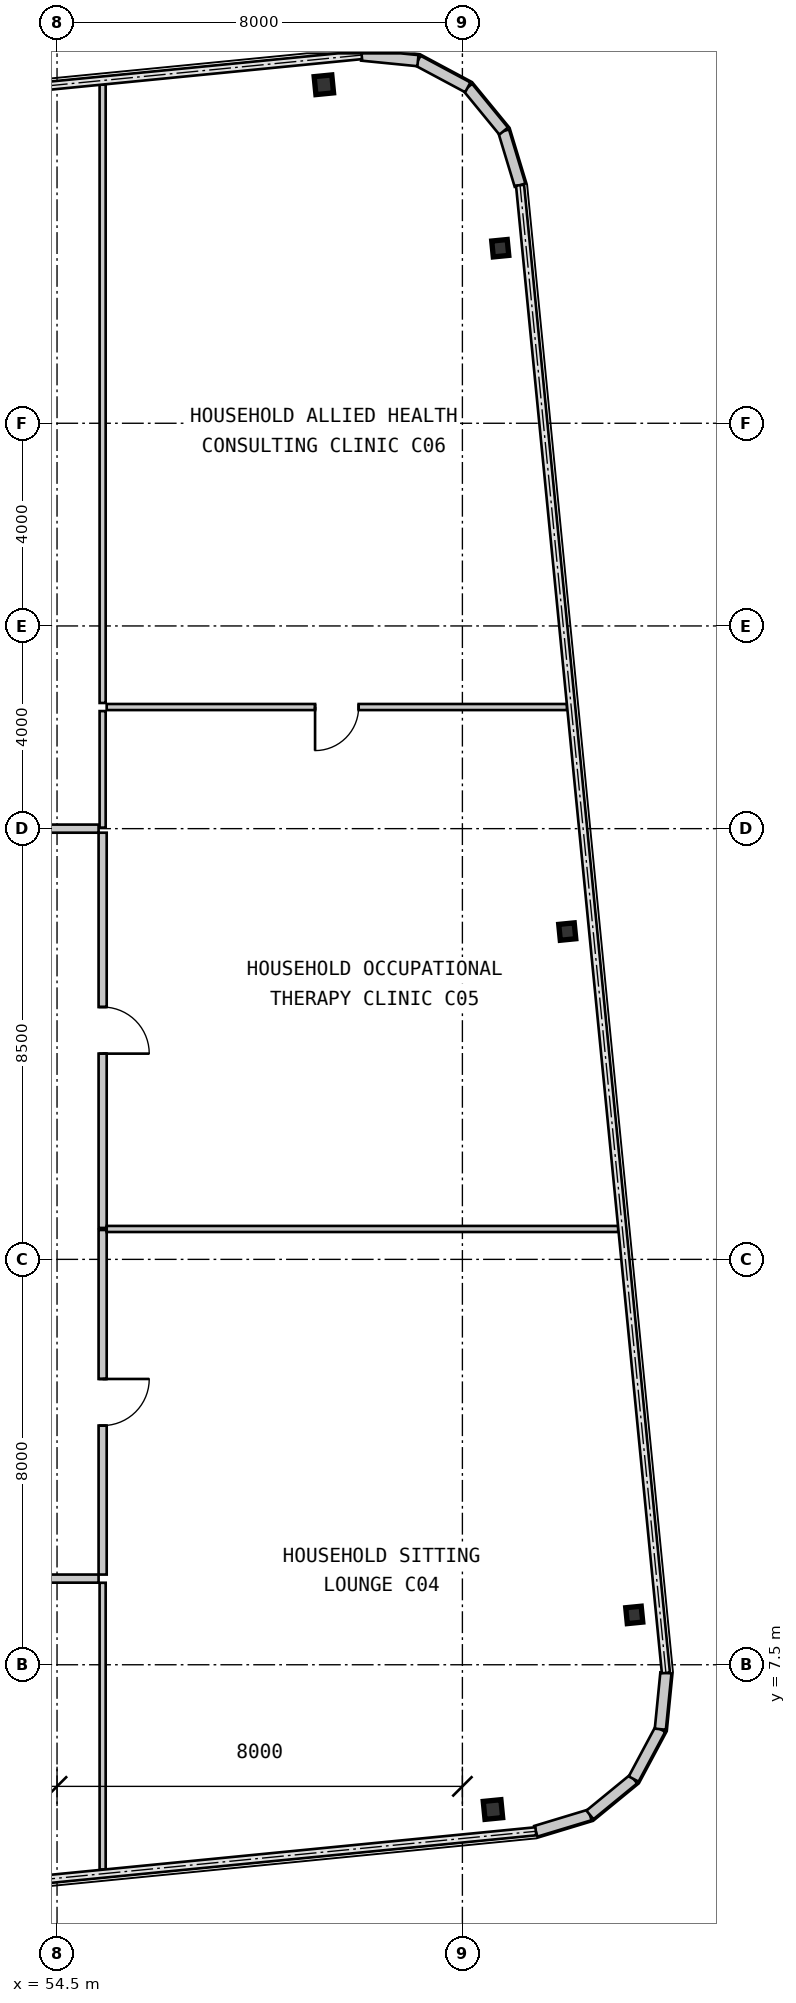
"""IFC4 building model, lengths in metres.
Left out: names, types, materials, properties, quantities, classifications, styles, units other than length and angle.
Written with IfcOpenShell. Run it as: python <this file> out.ifc"""

import sys

from ifc_helpers import new_model, si_unit, direction, frame, frame_2d, origin, origin_2d, place, context, subcontext, project, spatial, rectangle, i_section, extrude, source, transform, mapped, element, fill, save


model = new_model("IFC4")
c1 = context("Model", 3, precision=1e-05, world=origin(), true_north=direction((0.0, 1.0)))
c2 = subcontext(c1, "Body", "Model", "MODEL_VIEW")
j1 = project(units=[si_unit("LENGTHUNIT", "METRE"), si_unit("PLANEANGLEUNIT", "RADIAN")], contexts=[c1])
p1 = place(None, origin())
s1 = spatial("IfcSite", under=j1, at=p1, CompositionType="ELEMENT")
p2 = place(p1, origin())
s2 = spatial("IfcBuilding", under=s1, at=p2, CompositionType="ELEMENT")
p3 = place(p2, frame((0.0, 0.0, 87.15)))
s3 = spatial("IfcBuildingStorey", under=s2, at=p3, CompositionType="ELEMENT", Elevation=87.15)
m1 = source(origin(), c2, "Body", "SweptSolid", [
    extrude(i_section(OverallWidth=0.35, OverallDepth=0.356, WebThickness=0.018, FlangeThickness=0.028, at=origin_2d()), origin(), (0.0, 0.0, 1.0), 3.15),
])
for number, where, z_axis, x_axis in (
    (1, (63.103, 4.643, 0.0), (0.0, 0.0, 1.0), (0.995, 0.098, 0.0)),
    (2, (59.766, 38.68, 0.0), (0.0, 0.0, 1.0), (0.995, 0.098, 0.0)),
):
    element("IfcColumn", number, at=place(p3, frame(where, z_axis=z_axis, x_axis=x_axis)), inside=s3, PredefinedType="COLUMN", context=c2, shape_type="MappedRepresentation", body=[
        mapped(m1, transform((0.0, 0.0, 0.0), scale=1.0)),
    ])
m2 = source(origin(), c2, "Body", "SweptSolid", [
    extrude(i_section(OverallWidth=0.307, OverallDepth=0.315, WebThickness=0.012, FlangeThickness=0.019, at=origin_2d()), origin(), (0.0, 0.0, 1.0), 3.15),
])
for number, where, z_axis, x_axis in (
    (3, (65.892, 8.484, 0.0), (0.0, 0.0, 1.0), (0.995, 0.098, 0.0)),
    (4, (64.57, 21.969, 0.0), (0.0, 0.0, 1.0), (0.995, 0.098, 0.0)),
    (5, (63.247, 35.454, 0.0), (0.0, 0.0, 1.0), (0.995, 0.098, 0.0)),
):
    element("IfcColumn", number, at=place(p3, frame(where, z_axis=z_axis, x_axis=x_axis)), inside=s3, PredefinedType="COLUMN", context=c2, shape_type="MappedRepresentation", body=[
        mapped(m2, transform((0.0, 0.0, 0.0), scale=1.0)),
    ])
m3 = source(origin(), c2, "Body", "SweptSolid", [
    extrude(rectangle(XDim=1.116, YDim=0.22, at=frame_2d((0.558, 0.0))), origin(), (0.0, 0.0, 1.0), 2.93),
])
p4 = place(p3, frame((63.949, 4.214, 0.0), z_axis=(0.0, 0.0, 1.0), x_axis=(0.957052003726, 0.289916301997, 0.0)))
e6 = element("IfcWall", 6, at=p4, inside=s3, PredefinedType="SOLIDWALL", context=c2, shape_type="MappedRepresentation", body=[
    mapped(m3, transform((0.0, 0.0, 0.0), scale=1.0)),
])
m4 = source(origin(), c2, "Body", "SweptSolid", [
    extrude(rectangle(XDim=1.116, YDim=0.22, at=frame_2d((0.558, 0.0))), origin(), (0.0, 0.0, 1.0), 2.93),
])
p5 = place(p3, frame((65.017, 4.537, 0.0), z_axis=(0.0, 0.0, 1.0), x_axis=(0.773342870285, 0.633988016432, 0.0)))
e7 = element("IfcWall", 7, at=p5, inside=s3, PredefinedType="SOLIDWALL", context=c2, shape_type="MappedRepresentation", body=[
    mapped(m4, transform((0.0, 0.0, 0.0), scale=1.0)),
])
p6 = place(p3, frame((65.88, 5.245, 0.0), z_axis=(0.0, 0.0, 1.0), x_axis=(0.471723463201, 0.881746547635, 0.0)))
e8 = element("IfcWall", 8, at=p6, inside=s3, PredefinedType="SOLIDWALL", context=c2, shape_type="MappedRepresentation", body=[
    mapped(m3, transform((0.0, 0.0, 0.0), scale=1.0)),
])
for number, where, z_axis, x_axis in (
    (9, (66.406, 6.229, 0.0), (0.0, 0.0, 1.0), (0.098, 0.995, 0.0)),
    (10, (63.638, 36.698, 0.0), (0.0, 0.0, 1.0), (-0.29, 0.957, 0.0)),
):
    element("IfcWall", number, at=place(p3, frame(where, z_axis=z_axis, x_axis=x_axis)), inside=s3, PredefinedType="SOLIDWALL", context=c2, shape_type="MappedRepresentation", body=[
        mapped(m4, transform((0.0, 0.0, 0.0), scale=1.0)),
    ])
p7 = place(p3, frame((63.314, 37.766, 0.0), z_axis=(0.0, 0.0, 1.0), x_axis=(-0.634095287989, 0.773254916409, 0.0)))
e11 = element("IfcWall", 11, at=p7, inside=s3, PredefinedType="SOLIDWALL", context=c2, shape_type="MappedRepresentation", body=[
    mapped(m3, transform((0.0, 0.0, 0.0), scale=1.0)),
])
for number, where, z_axis, x_axis in (
    (12, (62.607, 38.629, 0.0), (0.0, 0.0, 1.0), (-0.882, 0.472, 0.0)),
    (13, (61.623, 39.156, 0.0), (0.0, 0.0, 1.0), (-0.995, 0.098, 0.0)),
):
    element("IfcWall", number, at=place(p3, frame(where, z_axis=z_axis, x_axis=x_axis)), inside=s3, PredefinedType="SOLIDWALL", context=c2, shape_type="MappedRepresentation", body=[
        mapped(m4, transform((0.0, 0.0, 0.0), scale=1.0)),
    ])
m5 = source(origin(), c2, "Body", "SweptSolid", [
    extrude(rectangle(XDim=2.04, YDim=0.16, at=frame_2d((1.02, 0.0))), origin(), (0.0, 0.0, 1.0), 2.93),
])
p8 = place(p3, frame((55.32, 9.2, 0.0), z_axis=(0.0, 0.0, 1.0), x_axis=(-1.0, 0.0, 0.0)))
e14 = element("IfcWall", 14, at=p8, inside=s3, PredefinedType="PARTITIONING", context=c2, shape_type="MappedRepresentation", body=[
    mapped(m5, transform((0.0, 0.0, 0.0), scale=1.0)),
])
m6 = source(origin(), c2, "Body", "SweptSolid", [
    extrude(rectangle(XDim=6.8, YDim=0.16, at=frame_2d((3.4, 0.0))), origin(), (0.0, 0.0, 1.0), 2.93),
])
p9 = place(p3, frame((55.4, 16.08, 0.0), z_axis=(0.0, 0.0, 1.0), x_axis=(0.0, -1.0, 0.0)))
e15 = element("IfcWall", 15, at=p9, inside=s3, PredefinedType="PARTITIONING", context=c2, shape_type="MappedRepresentation", body=[
    mapped(m6, transform((0.0, 0.0, 0.0), scale=1.0)),
])
m7 = source(origin(), c2, "Body", "SweptSolid", [
    extrude(rectangle(XDim=0.92, YDim=2.1, at=frame_2d((0.46, 1.05))), frame((0.0, 0.09, 0.0), z_axis=(0.0, -1.0, 0.0), x_axis=(1.0, 0.0, 0.0)), (0.0, 0.0, 1.0), 0.18),
])
p10 = place(p9, frame((2.94, 0.0, 0.0)))
e16 = element("IfcOpeningElement", 16, at=p10, cuts=e15, PredefinedType="OPENING", context=c2, shape_type="MappedRepresentation", body=[
    mapped(m7, transform((0.0, 0.0, 0.0), scale=1.0)),
])
m8 = source(origin(), c2, "Body", "SweptSolid", [
    extrude(rectangle(XDim=7.8, YDim=0.16, at=frame_2d((3.9, 0.0))), origin(), (0.0, 0.0, 1.0), 2.93),
])
p11 = place(p3, frame((55.4, 23.92, 0.0), z_axis=(0.0, 0.0, 1.0), x_axis=(0.0, -1.0, 0.0)))
e17 = element("IfcWall", 17, at=p11, inside=s3, PredefinedType="PARTITIONING", context=c2, shape_type="MappedRepresentation", body=[
    mapped(m8, transform((0.0, 0.0, 0.0), scale=1.0)),
])
p12 = place(p11, frame((3.44, 0.0, 0.0)))
e18 = element("IfcOpeningElement", 18, at=p12, cuts=e17, PredefinedType="OPENING", context=c2, shape_type="MappedRepresentation", body=[
    mapped(m7, transform((0.0, 0.0, 0.0), scale=1.0)),
])
m9 = source(origin(), c2, "Body", "SweptSolid", [
    extrude(rectangle(XDim=3.016, YDim=0.16, at=frame_2d((1.508, 0.0))), origin(), (0.0, 0.0, 1.0), 2.93),
])
p13 = place(p3, frame((52.304, 24.0, 0.0), z_axis=(0.0, 0.0, 1.0), x_axis=(1.0, 0.0, 0.0)))
e19 = element("IfcWall", 19, at=p13, inside=s3, PredefinedType="PARTITIONING", context=c2, shape_type="MappedRepresentation", body=[
    mapped(m9, transform((0.0, 0.0, 0.0), scale=1.0)),
])
m10 = source(origin(), c2, "Body", "SweptSolid", [
    extrude(rectangle(XDim=5.658, YDim=0.12, at=frame_2d((2.829, 0.0))), origin(), (0.0, 0.0, 1.0), 2.93),
])
p14 = place(p3, frame((55.4, 9.118, 0.0), z_axis=(0.0, 0.0, 1.0), x_axis=(0.0, -1.0, 0.0)))
e20 = element("IfcWall", 20, at=p14, inside=s3, PredefinedType="PARTITIONING", context=c2, shape_type="MappedRepresentation", body=[
    mapped(m10, transform((0.0, 0.0, 0.0), scale=1.0)),
])
m11 = source(origin(), c2, "Body", "SweptSolid", [
    extrude(rectangle(XDim=10.095, YDim=0.12, at=frame_2d((5.047, 0.0))), origin(), (0.0, 0.0, 1.0), 2.93),
])
p15 = place(p3, frame((55.48, 16.1, 0.0), z_axis=(0.0, 0.0, 1.0), x_axis=(1.0, 0.0, 0.0)))
e21 = element("IfcWall", 21, at=p15, inside=s3, PredefinedType="PARTITIONING", context=c2, shape_type="MappedRepresentation", body=[
    mapped(m11, transform((0.0, 0.0, 0.0), scale=1.0)),
])
m12 = source(origin(), c2, "Body", "SweptSolid", [
    extrude(rectangle(XDim=9.085, YDim=0.12, at=frame_2d((4.542, 0.0))), origin(), (0.0, 0.0, 1.0), 2.93),
])
p16 = place(p3, frame((55.48, 26.4, 0.0), z_axis=(0.0, 0.0, 1.0), x_axis=(1.0, 0.0, 0.0)))
e22 = element("IfcWall", 22, at=p16, inside=s3, PredefinedType="PARTITIONING", context=c2, shape_type="MappedRepresentation", body=[
    mapped(m12, transform((0.0, 0.0, 0.0), scale=1.0)),
])
m13 = source(origin(), c2, "Body", "SweptSolid", [
    extrude(rectangle(XDim=0.86, YDim=2.1, at=frame_2d((0.43, 1.05))), frame((0.0, 0.07, 0.0), z_axis=(0.0, -1.0, 0.0), x_axis=(1.0, 0.0, 0.0)), (0.0, 0.0, 1.0), 0.14),
])
p17 = place(p16, frame((4.112, 0.0, 0.0)))
e23 = element("IfcOpeningElement", 23, at=p17, cuts=e22, PredefinedType="OPENING", context=c2, shape_type="MappedRepresentation", body=[
    mapped(m13, transform((0.0, 0.0, 0.0), scale=1.0)),
])
m14 = source(origin(), c2, "Body", "SweptSolid", [
    extrude(rectangle(XDim=2.3, YDim=0.12, at=frame_2d((1.15, 0.0))), origin(), (0.0, 0.0, 1.0), 2.93),
])
p18 = place(p3, frame((55.4, 24.02, 0.0), z_axis=(0.0, 0.0, 1.0), x_axis=(0.0, 1.0, 0.0)))
e24 = element("IfcWall", 24, at=p18, inside=s3, PredefinedType="PARTITIONING", context=c2, shape_type="MappedRepresentation", body=[
    mapped(m14, transform((0.0, 0.0, 0.0), scale=1.0)),
])
m15 = source(origin(), c2, "Body", "SweptSolid", [
    extrude(rectangle(XDim=12.202, YDim=0.12, at=frame_2d((6.101, 0.0))), origin(), (0.0, 0.0, 1.0), 2.93),
])
p19 = place(p3, frame((55.4, 26.48, 0.0), z_axis=(0.0, 0.0, 1.0), x_axis=(0.0, 1.0, 0.0)))
e25 = element("IfcWall", 25, at=p19, inside=s3, PredefinedType="PARTITIONING", context=c2, shape_type="MappedRepresentation", body=[
    mapped(m15, transform((0.0, 0.0, 0.0), scale=1.0)),
])
m16 = source(origin(), c2, "Body", "SweptSolid", [
    extrude(rectangle(XDim=0.92, YDim=2.1, at=frame_2d((0.46, 1.05))), frame((0.0, 0.025, 0.0), z_axis=(0.0, -1.0, 0.0), x_axis=(1.0, 0.0, 0.0)), (0.0, 0.0, 1.0), 0.05),
])
p20 = place(p10, origin())
e26 = element("IfcDoor", 26, at=p20, inside=s3, OperationType="SINGLE_SWING_LEFT", PredefinedType="DOOR", context=c2, shape_type="MappedRepresentation", body=[
    mapped(m16, transform((0.0, 0.0, 0.0), scale=1.0)),
])
fill(e16, e26)
p21 = place(p12, origin())
e27 = element("IfcDoor", 27, at=p21, inside=s3, OperationType="SINGLE_SWING_RIGHT", PredefinedType="DOOR", context=c2, shape_type="MappedRepresentation", body=[
    mapped(m16, transform((0.0, 0.0, 0.0), scale=1.0)),
])
fill(e18, e27)
m17 = source(origin(), c2, "Body", "SweptSolid", [
    extrude(rectangle(XDim=0.86, YDim=2.1, at=frame_2d((0.43, 1.05))), frame((0.0, 0.025, 0.0), z_axis=(0.0, -1.0, 0.0), x_axis=(1.0, 0.0, 0.0)), (0.0, 0.0, 1.0), 0.05),
])
p22 = place(p17, frame((0.86, 0.0, 0.0), z_axis=(0.0, 0.0, 1.0), x_axis=(-1.0, 0.0, 0.0)))
e28 = element("IfcDoor", 28, at=p22, inside=s3, OperationType="SINGLE_SWING_RIGHT", PredefinedType="DOOR", context=c2, shape_type="MappedRepresentation", body=[
    mapped(m17, transform((0.0, 0.0, 0.0), scale=1.0)),
])
fill(e23, e28)
save(model, sys.argv[1])
